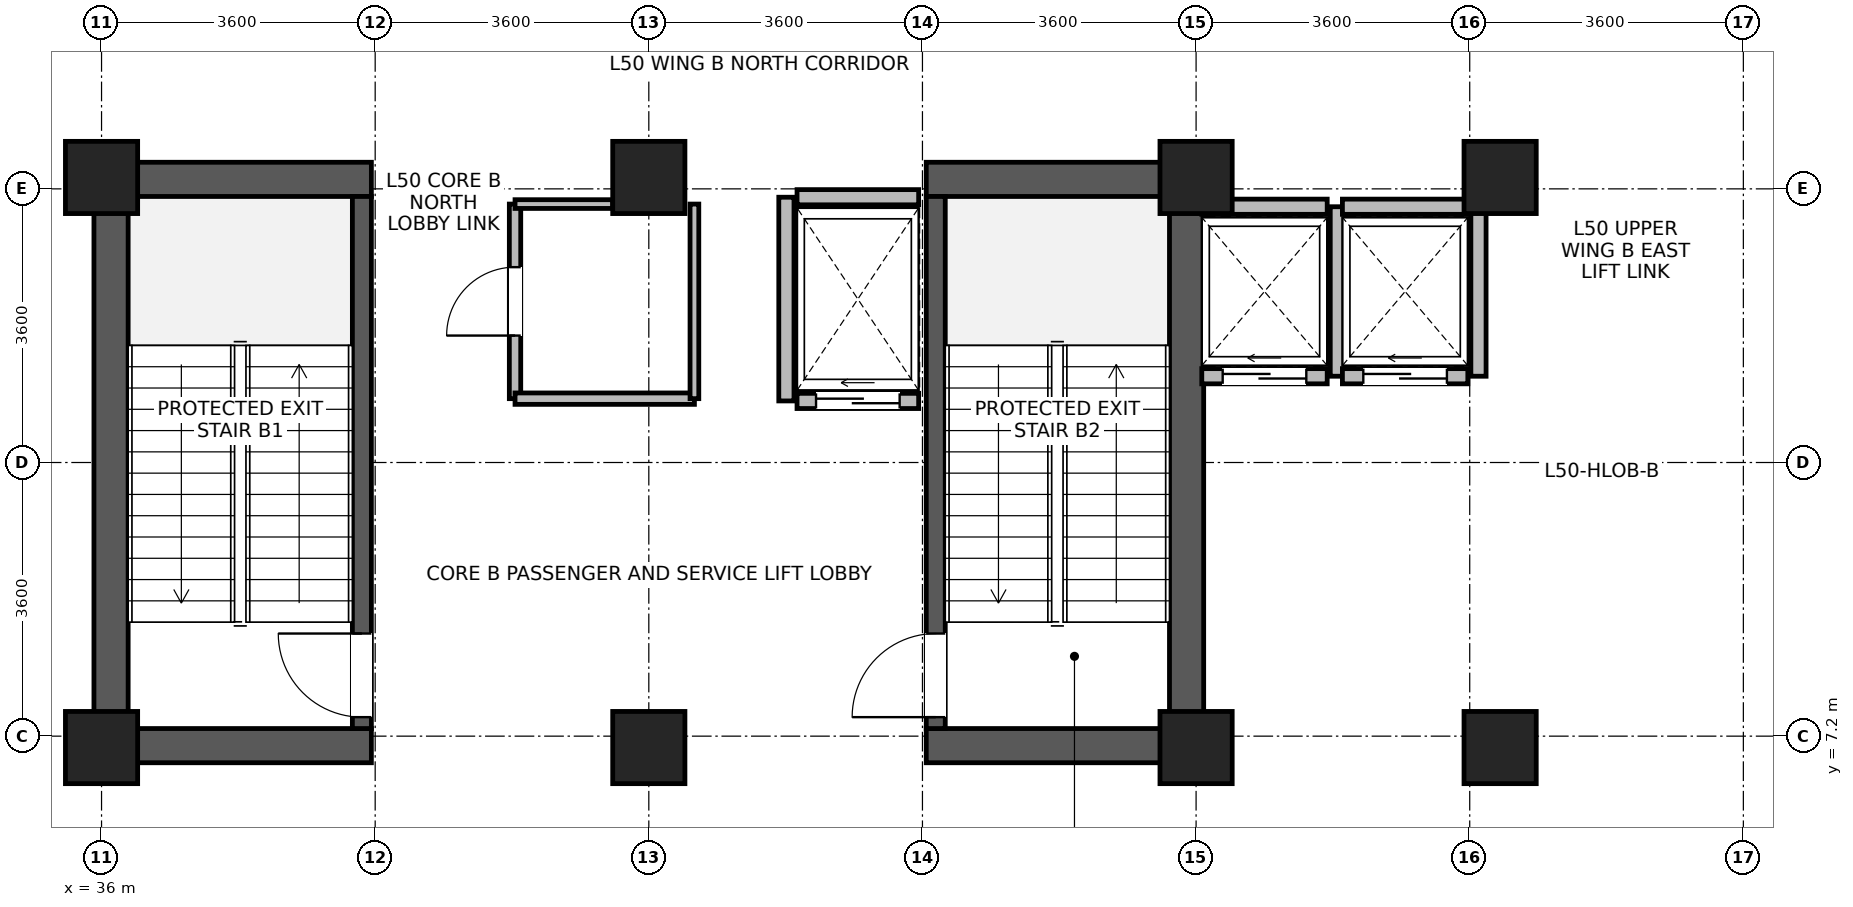
"""IFC4 building model, lengths in metres.
Left out: names, types, materials, properties, quantities, classifications, styles, units other than length and angle.
Written with IfcOpenShell. Run it as: python <this file> out.ifc"""

import sys

from ifc_helpers import new_model, si_unit, direction, frame, frame_2d, origin, origin_2d, place, context, subcontext, project, spatial, rectangle, extrude, source, transform, mapped, element, fill, save


model = new_model("IFC4")
c1 = context("Model", 3, precision=1e-05, world=origin(), true_north=direction((0.0, 1.0)))
c2 = subcontext(c1, "Body", "Model", "MODEL_VIEW")
j1 = project(units=[si_unit("LENGTHUNIT", "METRE"), si_unit("PLANEANGLEUNIT", "RADIAN")], contexts=[c1])
p1 = place(None, origin())
s1 = spatial("IfcSite", under=j1, at=p1, CompositionType="ELEMENT")
p2 = place(p1, origin())
s2 = spatial("IfcBuilding", under=s1, at=p2, CompositionType="ELEMENT")
p3 = place(p2, frame((0.0, 0.0, 197.2)))
s3 = spatial("IfcBuildingStorey", under=s2, at=p3, CompositionType="ELEMENT", Elevation=197.2)
for number, where, z_axis, x_axis in (
    (1, (36.125, 6.85, 0.0), (0.0, 0.0, 1.0), (0.0, 1.0, 0.0)),
    (2, (50.275, 6.85, 0.0), (0.0, 0.0, 1.0), (0.0, 1.0, 0.0)),
):
    element("IfcWall", number, at=place(p3, frame(where, z_axis=z_axis, x_axis=x_axis)), inside=s3, PredefinedType="SHEAR", context=c2, shape_type="SweptSolid", body=[
        extrude(rectangle(XDim=7.9, YDim=0.45, at=frame_2d((3.95, 0.0))), origin(), (0.0, 0.0, 1.0), 4.37),
    ])
for number, where, z_axis, x_axis in (
    (3, (36.35, 7.075, 0.0), (0.0, 0.0, 1.0), (1.0, 0.0, 0.0)),
    (4, (46.85, 7.075, 0.0), (0.0, 0.0, 1.0), (1.0, 0.0, 0.0)),
    (5, (36.35, 14.525, 0.0), (0.0, 0.0, 1.0), (1.0, 0.0, 0.0)),
    (6, (46.85, 14.525, 0.0), (0.0, 0.0, 1.0), (1.0, 0.0, 0.0)),
):
    element("IfcWall", number, at=place(p3, frame(where, z_axis=z_axis, x_axis=x_axis)), inside=s3, PredefinedType="SHEAR", context=c2, shape_type="SweptSolid", body=[
        extrude(rectangle(XDim=3.2, YDim=0.45, at=frame_2d((1.6, 0.0))), origin(), (0.0, 0.0, 1.0), 4.37),
    ])
p4 = place(p3, frame((39.425, 7.3, 0.0), z_axis=(0.0, 0.0, 1.0), x_axis=(0.0, 1.0, 0.0)))
e7 = element("IfcWall", 7, at=p4, inside=s3, PredefinedType="SHEAR", context=c2, shape_type="SweptSolid", body=[
    extrude(rectangle(XDim=7.0, YDim=0.25, at=frame_2d((3.5, 0.0))), origin(), (0.0, 0.0, 1.0), 4.37),
])
p5 = place(p4, frame((0.15, 0.0, 0.0)))
e8 = element("IfcOpeningElement", 8, at=p5, cuts=e7, PredefinedType="OPENING", context=c2, shape_type="SweptSolid", body=[
    extrude(rectangle(XDim=1.1, YDim=2.08, at=frame_2d((0.55, 1.04))), frame((0.0, 0.135, 0.0), z_axis=(0.0, -1.0, 0.0), x_axis=(1.0, 0.0, 0.0)), (0.0, 0.0, 1.0), 0.27),
])
p6 = place(p3, frame((46.975, 7.3, 0.0), z_axis=(0.0, 0.0, 1.0), x_axis=(0.0, 1.0, 0.0)))
e9 = element("IfcWall", 9, at=p6, inside=s3, PredefinedType="SHEAR", context=c2, shape_type="SweptSolid", body=[
    extrude(rectangle(XDim=7.0, YDim=0.25, at=frame_2d((3.5, 0.0))), origin(), (0.0, 0.0, 1.0), 4.37),
])
p7 = place(p6, frame((0.15, 0.0, 0.0)))
e10 = element("IfcOpeningElement", 10, at=p7, cuts=e9, PredefinedType="OPENING", context=c2, shape_type="SweptSolid", body=[
    extrude(rectangle(XDim=1.1, YDim=2.08, at=frame_2d((0.55, 1.04))), frame((0.0, 0.135, 0.0), z_axis=(0.0, -1.0, 0.0), x_axis=(1.0, 0.0, 0.0)), (0.0, 0.0, 1.0), 0.27),
])
m1 = source(origin(), c2, "Body", "SweptSolid", [
    extrude(rectangle(XDim=0.95, YDim=0.95, at=origin_2d()), origin(), (0.0, 0.0, 1.0), 4.6),
])
for number, where, z_axis, x_axis in (
    (11, (36.0, 7.05, 0.0), (0.0, 0.0, 1.0), (1.0, 0.0, 0.0)),
    (12, (36.0, 14.55, 0.0), (0.0, 0.0, 1.0), (1.0, 0.0, 0.0)),
    (13, (43.2, 7.05, 0.0), (0.0, 0.0, 1.0), (1.0, 0.0, 0.0)),
    (14, (43.2, 14.55, 0.0), (0.0, 0.0, 1.0), (1.0, 0.0, 0.0)),
    (15, (50.4, 7.05, 0.0), (0.0, 0.0, 1.0), (1.0, 0.0, 0.0)),
    (16, (50.4, 14.55, 0.0), (0.0, 0.0, 1.0), (1.0, 0.0, 0.0)),
    (17, (54.4, 7.05, 0.0), (0.0, 0.0, 1.0), (1.0, 0.0, 0.0)),
    (18, (54.4, 14.55, 0.0), (0.0, 0.0, 1.0), (1.0, 0.0, 0.0)),
):
    element("IfcColumn", number, at=place(p3, frame(where, z_axis=z_axis, x_axis=x_axis)), inside=s3, PredefinedType="COLUMN", context=c2, shape_type="MappedRepresentation", body=[
        mapped(m1, transform((0.0, 0.0, 0.0), x_axis=(1.0, 0.0, 0.0), y_axis=(0.0, 1.0, 0.0), z_axis=(0.0, 0.0, 1.0), scale=1.0)),
    ])
p8 = place(p3, frame((50.475, 11.935, 0.0), z_axis=(0.0, 0.0, 1.0), x_axis=(1.0, 0.0, 0.0)))
e19 = element("IfcWall", 19, at=p8, inside=s3, PredefinedType="PARTITIONING", context=c2, shape_type="SweptSolid", body=[
    extrude(rectangle(XDim=1.65, YDim=0.2, at=frame_2d((0.825, 0.0))), origin(), (0.0, 0.0, 1.0), 4.35),
])
p9 = place(p8, frame((0.275, 0.0, 0.0)))
e20 = element("IfcOpeningElement", 20, at=p9, cuts=e19, PredefinedType="OPENING", context=c2, shape_type="SweptSolid", body=[
    extrude(rectangle(XDim=1.1, YDim=2.12, at=frame_2d((0.55, 1.06))), frame((0.0, 0.11, 0.0), z_axis=(0.0, -1.0, 0.0), x_axis=(1.0, 0.0, 0.0)), (0.0, 0.0, 1.0), 0.22),
])
p10 = place(p3, frame((50.475, 14.165, 0.0), z_axis=(0.0, 0.0, 1.0), x_axis=(1.0, 0.0, 0.0)))
e21 = element("IfcWall", 21, at=p10, inside=s3, PredefinedType="PARTITIONING", context=c2, shape_type="SweptSolid", body=[
    extrude(rectangle(XDim=1.65, YDim=0.2, at=frame_2d((0.825, 0.0))), origin(), (0.0, 0.0, 1.0), 4.35),
])
p11 = place(p3, frame((52.265, 11.935, 0.0), z_axis=(0.0, 0.0, 1.0), x_axis=(0.0, 1.0, 0.0)))
e22 = element("IfcWall", 22, at=p11, inside=s3, PredefinedType="PARTITIONING", context=c2, shape_type="SweptSolid", body=[
    extrude(rectangle(XDim=2.23, YDim=0.2, at=frame_2d((1.115, 0.0))), origin(), (0.0, 0.0, 1.0), 4.35),
])
p12 = place(p3, frame((52.325, 11.935, 0.0), z_axis=(0.0, 0.0, 1.0), x_axis=(1.0, 0.0, 0.0)))
e23 = element("IfcWall", 23, at=p12, inside=s3, PredefinedType="PARTITIONING", context=c2, shape_type="SweptSolid", body=[
    extrude(rectangle(XDim=1.65, YDim=0.2, at=frame_2d((0.825, 0.0))), origin(), (0.0, 0.0, 1.0), 4.35),
])
p13 = place(p12, frame((0.275, 0.0, 0.0)))
e24 = element("IfcOpeningElement", 24, at=p13, cuts=e23, PredefinedType="OPENING", context=c2, shape_type="SweptSolid", body=[
    extrude(rectangle(XDim=1.1, YDim=2.12, at=frame_2d((0.55, 1.06))), frame((0.0, 0.11, 0.0), z_axis=(0.0, -1.0, 0.0), x_axis=(1.0, 0.0, 0.0)), (0.0, 0.0, 1.0), 0.22),
])
p14 = place(p3, frame((52.325, 14.165, 0.0), z_axis=(0.0, 0.0, 1.0), x_axis=(1.0, 0.0, 0.0)))
e25 = element("IfcWall", 25, at=p14, inside=s3, PredefinedType="PARTITIONING", context=c2, shape_type="SweptSolid", body=[
    extrude(rectangle(XDim=1.65, YDim=0.2, at=frame_2d((0.825, 0.0))), origin(), (0.0, 0.0, 1.0), 4.35),
])
p15 = place(p3, frame((54.115, 11.935, 0.0), z_axis=(0.0, 0.0, 1.0), x_axis=(0.0, 1.0, 0.0)))
e26 = element("IfcWall", 26, at=p15, inside=s3, PredefinedType="PARTITIONING", context=c2, shape_type="SweptSolid", body=[
    extrude(rectangle(XDim=2.23, YDim=0.2, at=frame_2d((1.115, 0.0))), origin(), (0.0, 0.0, 1.0), 4.35),
])
p16 = place(p3, frame((45.15, 11.61, 0.0), z_axis=(0.0, 0.0, 1.0), x_axis=(1.0, 0.0, 0.0)))
e27 = element("IfcWall", 27, at=p16, inside=s3, PredefinedType="PARTITIONING", context=c2, shape_type="SweptSolid", body=[
    extrude(rectangle(XDim=1.6, YDim=0.2, at=frame_2d((0.8, 0.0))), origin(), (0.0, 0.0, 1.0), 4.35),
])
p17 = place(p16, frame((0.25, 0.0, 0.0)))
e28 = element("IfcOpeningElement", 28, at=p17, cuts=e27, PredefinedType="OPENING", context=c2, shape_type="SweptSolid", body=[
    extrude(rectangle(XDim=1.1, YDim=2.12, at=frame_2d((0.55, 1.06))), frame((0.0, 0.11, 0.0), z_axis=(0.0, -1.0, 0.0), x_axis=(1.0, 0.0, 0.0)), (0.0, 0.0, 1.0), 0.22),
])
p18 = place(p3, frame((45.15, 14.29, 0.0), z_axis=(0.0, 0.0, 1.0), x_axis=(1.0, 0.0, 0.0)))
e29 = element("IfcWall", 29, at=p18, inside=s3, PredefinedType="PARTITIONING", context=c2, shape_type="SweptSolid", body=[
    extrude(rectangle(XDim=1.6, YDim=0.2, at=frame_2d((0.8, 0.0))), origin(), (0.0, 0.0, 1.0), 3.35),
])
p19 = place(p3, frame((45.01, 11.61, 0.0), z_axis=(0.0, 0.0, 1.0), x_axis=(0.0, 1.0, 0.0)))
e30 = element("IfcWall", 30, at=p19, inside=s3, PredefinedType="PARTITIONING", context=c2, shape_type="SweptSolid", body=[
    extrude(rectangle(XDim=2.68, YDim=0.2, at=frame_2d((1.34, 0.0))), origin(), (0.0, 0.0, 1.0), 4.35),
])
p20 = place(p3, frame((41.44, 11.64, 0.0), z_axis=(0.0, 0.0, 1.0), x_axis=(0.0, 1.0, 0.0)))
e31 = element("IfcWall", 31, at=p20, inside=s3, PredefinedType="PARTITIONING", context=c2, shape_type="SweptSolid", body=[
    extrude(rectangle(XDim=2.56, YDim=0.15, at=frame_2d((1.28, 0.0))), origin(), (0.0, 0.0, 1.0), 4.35),
])
p21 = place(p20, frame((0.83, 0.0, 0.0)))
e32 = element("IfcOpeningElement", 32, at=p21, cuts=e31, PredefinedType="OPENING", context=c2, shape_type="SweptSolid", body=[
    extrude(rectangle(XDim=0.9, YDim=2.08, at=frame_2d((0.45, 1.04))), frame((0.0, 0.085, 0.0), z_axis=(0.0, -1.0, 0.0), x_axis=(1.0, 0.0, 0.0)), (0.0, 0.0, 1.0), 0.17),
])
p22 = place(p3, frame((41.44, 11.64, 0.0), z_axis=(0.0, 0.0, 1.0), x_axis=(1.0, 0.0, 0.0)))
e33 = element("IfcWall", 33, at=p22, inside=s3, PredefinedType="PARTITIONING", context=c2, shape_type="SweptSolid", body=[
    extrude(rectangle(XDim=2.36, YDim=0.15, at=frame_2d((1.18, 0.0))), origin(), (0.0, 0.0, 1.0), 4.35),
])
p23 = place(p3, frame((43.8, 11.64, 0.0), z_axis=(0.0, 0.0, 1.0), x_axis=(0.0, 1.0, 0.0)))
e34 = element("IfcWall", 34, at=p23, inside=s3, PredefinedType="PARTITIONING", context=c2, shape_type="SweptSolid", body=[
    extrude(rectangle(XDim=2.56, YDim=0.115, at=frame_2d((1.28, 0.0))), origin(), (0.0, 0.0, 1.0), 4.35),
])
p24 = place(p3, frame((41.44, 14.2, 0.0), z_axis=(0.0, 0.0, 1.0), x_axis=(1.0, 0.0, 0.0)))
e35 = element("IfcWall", 35, at=p24, inside=s3, PredefinedType="PARTITIONING", context=c2, shape_type="SweptSolid", body=[
    extrude(rectangle(XDim=1.285, YDim=0.115, at=frame_2d((0.643, 0.0))), origin(), (0.0, 0.0, 1.0), 3.35),
])
p25 = place(p5, origin())
e36 = element("IfcDoor", 36, at=p25, inside=s3, OperationType="SINGLE_SWING_RIGHT", PredefinedType="DOOR", context=c2, shape_type="SweptSolid", body=[
    extrude(rectangle(XDim=1.1, YDim=2.08, at=frame_2d((0.55, 1.04))), frame((0.0, 0.025, 0.0), z_axis=(0.0, -1.0, 0.0), x_axis=(1.0, 0.0, 0.0)), (0.0, 0.0, 1.0), 0.05),
])
fill(e8, e36)
p26 = place(p7, origin())
e37 = element("IfcDoor", 37, at=p26, inside=s3, OperationType="SINGLE_SWING_LEFT", PredefinedType="DOOR", context=c2, shape_type="SweptSolid", body=[
    extrude(rectangle(XDim=1.1, YDim=2.08, at=frame_2d((0.55, 1.04))), frame((0.0, 0.025, 0.0), z_axis=(0.0, -1.0, 0.0), x_axis=(1.0, 0.0, 0.0)), (0.0, 0.0, 1.0), 0.05),
])
fill(e10, e37)
p27 = place(p9, origin())
e38 = element("IfcDoor", 38, at=p27, inside=s3, OperationType="SLIDING_TO_LEFT", PredefinedType="DOOR", context=c2, shape_type="SweptSolid", body=[
    extrude(rectangle(XDim=1.1, YDim=2.12, at=frame_2d((0.55, 1.06))), frame((0.0, 0.025, 0.0), z_axis=(0.0, -1.0, 0.0), x_axis=(1.0, 0.0, 0.0)), (0.0, 0.0, 1.0), 0.05),
])
fill(e20, e38)
p28 = place(p13, origin())
e39 = element("IfcDoor", 39, at=p28, inside=s3, OperationType="SLIDING_TO_LEFT", PredefinedType="DOOR", context=c2, shape_type="SweptSolid", body=[
    extrude(rectangle(XDim=1.1, YDim=2.12, at=frame_2d((0.55, 1.06))), frame((0.0, 0.025, 0.0), z_axis=(0.0, -1.0, 0.0), x_axis=(1.0, 0.0, 0.0)), (0.0, 0.0, 1.0), 0.05),
])
fill(e24, e39)
p29 = place(p17, origin())
e40 = element("IfcDoor", 40, at=p29, inside=s3, OperationType="SLIDING_TO_LEFT", PredefinedType="DOOR", context=c2, shape_type="SweptSolid", body=[
    extrude(rectangle(XDim=1.1, YDim=2.12, at=frame_2d((0.55, 1.06))), frame((0.0, 0.025, 0.0), z_axis=(0.0, -1.0, 0.0), x_axis=(1.0, 0.0, 0.0)), (0.0, 0.0, 1.0), 0.05),
])
fill(e28, e40)
p30 = place(p21, origin())
e41 = element("IfcDoor", 41, at=p30, inside=s3, OperationType="SINGLE_SWING_LEFT", PredefinedType="DOOR", context=c2, shape_type="SweptSolid", body=[
    extrude(rectangle(XDim=0.9, YDim=2.08, at=frame_2d((0.45, 1.04))), frame((0.0, 0.025, 0.0), z_axis=(0.0, -1.0, 0.0), x_axis=(1.0, 0.0, 0.0)), (0.0, 0.0, 1.0), 0.05),
])
fill(e32, e41)
save(model, sys.argv[1])
